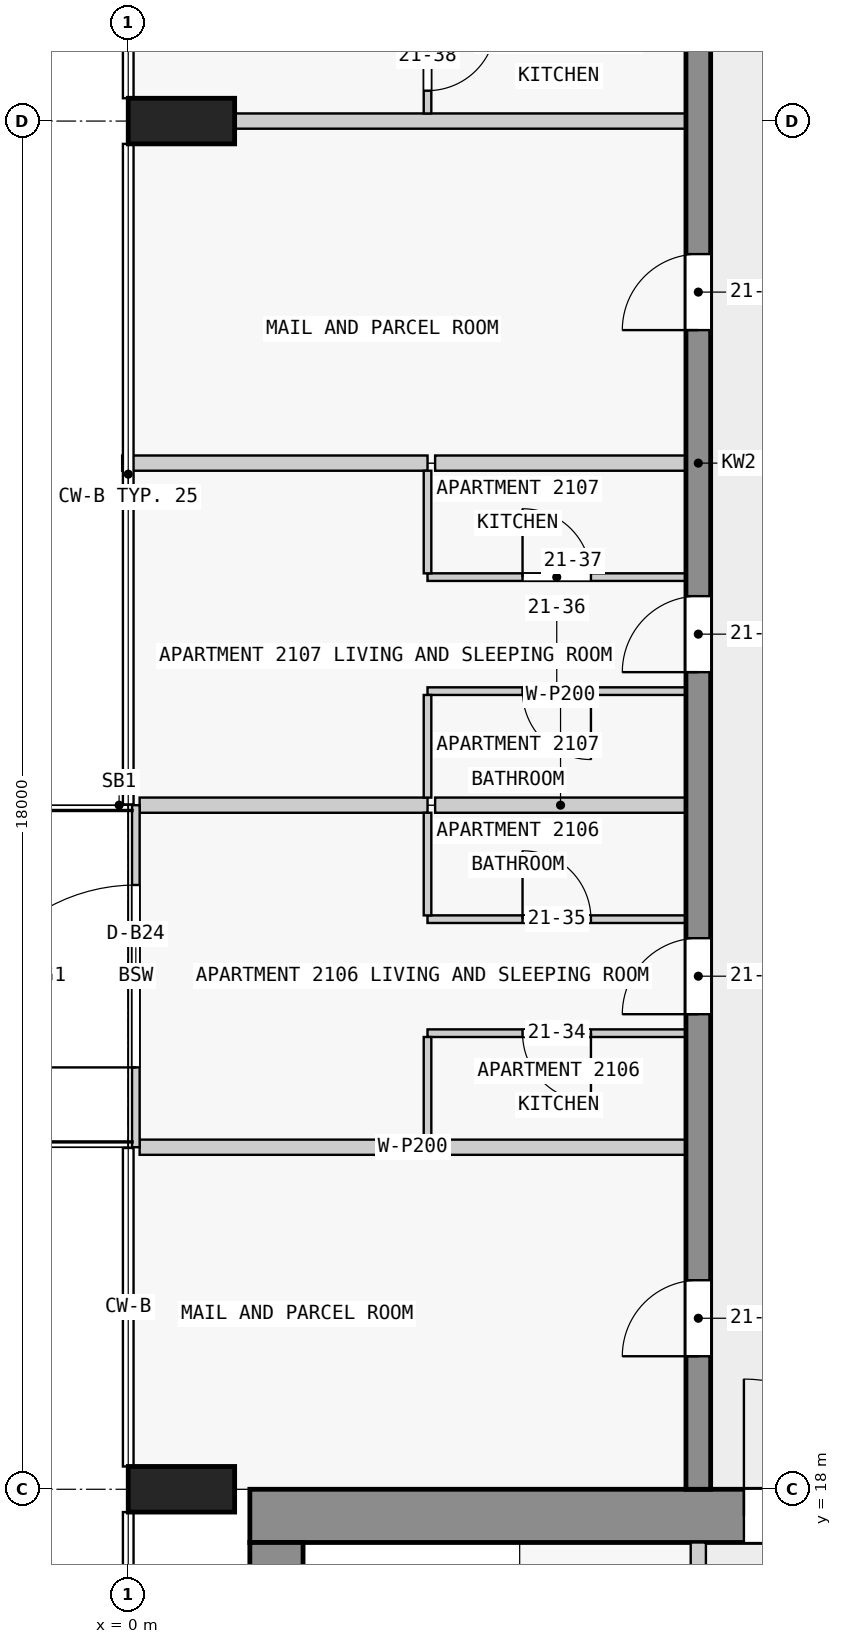
"""IFC4 building model, lengths in metres.
Left out: names, types, materials, properties, quantities, classifications, styles, units other than length and angle.
Written with IfcOpenShell. Run it as: python <this file> out.ifc"""

import sys

from ifc_helpers import new_model, si_unit, direction, frame, frame_2d, origin, origin_2d, place, context, subcontext, project, spatial, rectangle, extrude, element, fill, save


model = new_model("IFC4")
c1 = context("Model", 3, precision=1e-05, world=origin(), true_north=direction((0.0, 1.0)))
c2 = subcontext(c1, "Body", "Model", "MODEL_VIEW")
j1 = project(units=[si_unit("LENGTHUNIT", "METRE"), si_unit("PLANEANGLEUNIT", "RADIAN")], contexts=[c1])
p1 = place(None, origin())
s1 = spatial("IfcSite", under=j1, at=p1, CompositionType="ELEMENT")
p2 = place(p1, origin())
s2 = spatial("IfcBuilding", under=s1, at=p2, CompositionType="ELEMENT")
p3 = place(p2, frame((0.0, 0.0, 85.3)))
s3 = spatial("IfcBuildingStorey", under=s2, at=p3, CompositionType="ELEMENT", Elevation=85.3)
for number, where, z_axis, x_axis in (
    (1, (0.7, 36.0, 0.0), (0.0, 0.0, 1.0), (0.0, 1.0, 0.0)),
    (2, (0.7, 18.0, 0.0), (0.0, 0.0, 1.0), (0.0, 1.0, 0.0)),
):
    element("IfcColumn", number, at=place(p3, frame(where, z_axis=z_axis, x_axis=x_axis)), inside=s3, PredefinedType="COLUMN", context=c2, shape_type="SweptSolid", body=[
        extrude(rectangle(XDim=0.6, YDim=1.4, at=origin_2d()), origin(), (0.0, 0.0, 1.0), 3.5),
    ])
p4 = place(p3, frame((1.6, 17.65, 0.0), z_axis=(0.0, 0.0, 1.0), x_axis=(1.0, 0.0, 0.0)))
e3 = element("IfcWall", 3, at=p4, inside=s3, PredefinedType="SHEAR", context=c2, shape_type="SweptSolid", body=[
    extrude(rectangle(XDim=20.9, YDim=0.7, at=frame_2d((10.45, 0.0))), origin(), (0.0, 0.0, 1.0), 3.25),
])
p5 = place(p4, frame((6.5, 0.0, 0.0)))
e4 = element("IfcOpeningElement", 4, at=p5, cuts=e3, PredefinedType="OPENING", context=c2, shape_type="SweptSolid", body=[
    extrude(rectangle(XDim=1.8, YDim=2.1, at=frame_2d((0.9, 1.05))), frame((0.0, 0.36, 0.0), z_axis=(0.0, -1.0, 0.0), x_axis=(1.0, 0.0, 0.0)), (0.0, 0.0, 1.0), 0.72),
])
p6 = place(p3, frame((1.95, 2.5, 0.0), z_axis=(0.0, 0.0, 1.0), x_axis=(0.0, 1.0, 0.0)))
e5 = element("IfcWall", 5, at=p6, inside=s3, PredefinedType="SHEAR", context=c2, shape_type="SweptSolid", body=[
    extrude(rectangle(XDim=14.8, YDim=0.7, at=frame_2d((7.4, 0.0))), origin(), (0.0, 0.0, 1.0), 3.25),
])
p7 = place(p3, frame((7.5, 18.0, 0.0), z_axis=(0.0, 0.0, 1.0), x_axis=(0.0, 1.0, 0.0)))
e6 = element("IfcWall", 6, at=p7, inside=s3, PredefinedType="SHEAR", context=c2, shape_type="SweptSolid", body=[
    extrude(rectangle(XDim=27.0, YDim=0.325, at=frame_2d((13.5, 0.0))), origin(), (0.0, 0.0, 1.0), 3.25),
])
p8 = place(p7, frame((1.75, 0.0, 0.0)))
e7 = element("IfcOpeningElement", 7, at=p8, cuts=e6, PredefinedType="OPENING", context=c2, shape_type="SweptSolid", body=[
    extrude(rectangle(XDim=1.0, YDim=2.1, at=frame_2d((0.5, 1.05))), frame((0.0, 0.172, 0.0), z_axis=(0.0, -1.0, 0.0), x_axis=(1.0, 0.0, 0.0)), (0.0, 0.0, 1.0), 0.345),
])
p9 = place(p7, frame((6.25, 0.0, 0.0)))
e8 = element("IfcOpeningElement", 8, at=p9, cuts=e6, PredefinedType="OPENING", context=c2, shape_type="SweptSolid", body=[
    extrude(rectangle(XDim=1.0, YDim=2.1, at=frame_2d((0.5, 1.05))), frame((0.0, 0.172, 0.0), z_axis=(0.0, -1.0, 0.0), x_axis=(1.0, 0.0, 0.0)), (0.0, 0.0, 1.0), 0.345),
])
p10 = place(p7, frame((10.75, 0.0, 0.0)))
e9 = element("IfcOpeningElement", 9, at=p10, cuts=e6, PredefinedType="OPENING", context=c2, shape_type="SweptSolid", body=[
    extrude(rectangle(XDim=1.0, YDim=2.1, at=frame_2d((0.5, 1.05))), frame((0.0, 0.172, 0.0), z_axis=(0.0, -1.0, 0.0), x_axis=(1.0, 0.0, 0.0)), (0.0, 0.0, 1.0), 0.345),
])
p11 = place(p7, frame((15.25, 0.0, 0.0)))
e10 = element("IfcOpeningElement", 10, at=p11, cuts=e6, PredefinedType="OPENING", context=c2, shape_type="SweptSolid", body=[
    extrude(rectangle(XDim=1.0, YDim=2.1, at=frame_2d((0.5, 1.05))), frame((0.0, 0.172, 0.0), z_axis=(0.0, -1.0, 0.0), x_axis=(1.0, 0.0, 0.0)), (0.0, 0.0, 1.0), 0.345),
])
p12 = place(p7, frame((21.35, 0.0, 0.0)))
e11 = element("IfcOpeningElement", 11, at=p12, cuts=e6, PredefinedType="OPENING", context=c2, shape_type="SweptSolid", body=[
    extrude(rectangle(XDim=1.0, YDim=2.1, at=frame_2d((0.5, 1.05))), frame((0.0, 0.172, 0.0), z_axis=(0.0, -1.0, 0.0), x_axis=(1.0, 0.0, 0.0)), (0.0, 0.0, 1.0), 0.345),
])
p13 = place(p3, frame((0.1, 22.5, 0.0), z_axis=(0.0, 0.0, 1.0), x_axis=(0.0, 1.0, 0.0)))
e12 = element("IfcWall", 12, at=p13, inside=s3, PredefinedType="STANDARD", context=c2, shape_type="SweptSolid", body=[
    extrude(rectangle(XDim=4.5, YDim=0.1, at=frame_2d((2.25, 0.0))), origin(), (0.0, 0.0, 1.0), 3.25),
])
p14 = place(p13, frame((1.05, 0.0, 0.0)))
e13 = element("IfcOpeningElement", 13, at=p14, cuts=e12, PredefinedType="OPENING", context=c2, shape_type="SweptSolid", body=[
    extrude(rectangle(XDim=2.4, YDim=2.4, at=frame_2d((1.2, 1.2))), frame((0.0, 0.06, 0.0), z_axis=(0.0, -1.0, 0.0), x_axis=(1.0, 0.0, 0.0)), (0.0, 0.0, 1.0), 0.12),
])
p15 = place(p3, frame((7.5, 10.1, 0.0), z_axis=(0.0, 0.0, 1.0), x_axis=(0.0, 1.0, 0.0)))
e14 = element("IfcWall", 14, at=p15, inside=s3, PredefinedType="PARTITIONING", context=c2, shape_type="SweptSolid", body=[
    extrude(rectangle(XDim=7.2, YDim=0.2, at=frame_2d((3.6, 0.0))), origin(), (0.0, 0.0, 1.0), 3.25),
])
p16 = place(p15, frame((0.75, 0.0, 0.0)))
e15 = element("IfcOpeningElement", 15, at=p16, cuts=e14, PredefinedType="OPENING", context=c2, shape_type="SweptSolid", body=[
    extrude(rectangle(XDim=0.9, YDim=2.1, at=frame_2d((0.45, 1.05))), frame((0.0, 0.11, 0.0), z_axis=(0.0, -1.0, 0.0), x_axis=(1.0, 0.0, 0.0)), (0.0, 0.0, 1.0), 0.22),
])
p17 = place(p15, frame((3.175, 0.0, 0.0)))
e16 = element("IfcOpeningElement", 16, at=p17, cuts=e14, PredefinedType="OPENING", context=c2, shape_type="SweptSolid", body=[
    extrude(rectangle(XDim=0.9, YDim=2.1, at=frame_2d((0.45, 1.05))), frame((0.0, 0.11, 0.0), z_axis=(0.0, -1.0, 0.0), x_axis=(1.0, 0.0, 0.0)), (0.0, 0.0, 1.0), 0.22),
])
p18 = place(p15, frame((5.25, 0.0, 0.0)))
e17 = element("IfcOpeningElement", 17, at=p18, cuts=e14, PredefinedType="OPENING", context=c2, shape_type="SweptSolid", body=[
    extrude(rectangle(XDim=0.9, YDim=2.1, at=frame_2d((0.45, 1.05))), frame((0.0, 0.11, 0.0), z_axis=(0.0, -1.0, 0.0), x_axis=(1.0, 0.0, 0.0)), (0.0, 0.0, 1.0), 0.22),
])
p19 = place(p3, frame((7.337, 22.5, 0.0), z_axis=(0.0, 0.0, 1.0), x_axis=(-1.0, 0.0, 0.0)))
e18 = element("IfcWall", 18, at=p19, inside=s3, PredefinedType="PARTITIONING", context=c2, shape_type="SweptSolid", body=[
    extrude(rectangle(XDim=7.188, YDim=0.2, at=frame_2d((3.594, 0.0))), origin(), (0.0, 0.0, 1.0), 3.25),
])
p20 = place(p3, frame((7.337, 24.0, 0.0), z_axis=(0.0, 0.0, 1.0), x_axis=(-1.0, 0.0, 0.0)))
e19 = element("IfcWall", 19, at=p20, inside=s3, PredefinedType="PARTITIONING", context=c2, shape_type="SweptSolid", body=[
    extrude(rectangle(XDim=3.4, YDim=0.1, at=frame_2d((1.7, 0.0))), origin(), (0.0, 0.0, 1.0), 3.25),
])
p21 = place(p20, frame((1.25, 0.0, 0.0)))
e20 = element("IfcOpeningElement", 20, at=p21, cuts=e19, PredefinedType="OPENING", context=c2, shape_type="SweptSolid", body=[
    extrude(rectangle(XDim=0.9, YDim=2.1, at=frame_2d((0.45, 1.05))), frame((0.0, 0.06, 0.0), z_axis=(0.0, -1.0, 0.0), x_axis=(1.0, 0.0, 0.0)), (0.0, 0.0, 1.0), 0.12),
])
p22 = place(p3, frame((3.938, 25.5, 0.0), z_axis=(0.0, 0.0, 1.0), x_axis=(1.0, 0.0, 0.0)))
e21 = element("IfcWall", 21, at=p22, inside=s3, PredefinedType="PARTITIONING", context=c2, shape_type="SweptSolid", body=[
    extrude(rectangle(XDim=3.4, YDim=0.1, at=frame_2d((1.7, 0.0))), origin(), (0.0, 0.0, 1.0), 3.25),
])
p23 = place(p22, frame((1.25, 0.0, 0.0)))
e22 = element("IfcOpeningElement", 22, at=p23, cuts=e21, PredefinedType="OPENING", context=c2, shape_type="SweptSolid", body=[
    extrude(rectangle(XDim=0.9, YDim=2.1, at=frame_2d((0.45, 1.05))), frame((0.0, 0.06, 0.0), z_axis=(0.0, -1.0, 0.0), x_axis=(1.0, 0.0, 0.0)), (0.0, 0.0, 1.0), 0.12),
])
p24 = place(p3, frame((7.337, 27.0, 0.0), z_axis=(0.0, 0.0, 1.0), x_axis=(-1.0, 0.0, 0.0)))
e23 = element("IfcWall", 23, at=p24, inside=s3, PredefinedType="PARTITIONING", context=c2, shape_type="SweptSolid", body=[
    extrude(rectangle(XDim=3.3, YDim=0.2, at=frame_2d((1.65, 0.0))), origin(), (0.0, 0.0, 1.0), 3.25),
])
p25 = place(p3, frame((0.15, 27.0, 0.0), z_axis=(0.0, 0.0, 1.0), x_axis=(1.0, 0.0, 0.0)))
e24 = element("IfcWall", 24, at=p25, inside=s3, PredefinedType="PARTITIONING", context=c2, shape_type="SweptSolid", body=[
    extrude(rectangle(XDim=3.788, YDim=0.2, at=frame_2d((1.894, 0.0))), origin(), (0.0, 0.0, 1.0), 3.25),
])
p26 = place(p3, frame((7.337, 28.5, 0.0), z_axis=(0.0, 0.0, 1.0), x_axis=(-1.0, 0.0, 0.0)))
e25 = element("IfcWall", 25, at=p26, inside=s3, PredefinedType="PARTITIONING", context=c2, shape_type="SweptSolid", body=[
    extrude(rectangle(XDim=3.4, YDim=0.1, at=frame_2d((1.7, 0.0))), origin(), (0.0, 0.0, 1.0), 3.25),
])
p27 = place(p26, frame((1.25, 0.0, 0.0)))
e26 = element("IfcOpeningElement", 26, at=p27, cuts=e25, PredefinedType="OPENING", context=c2, shape_type="SweptSolid", body=[
    extrude(rectangle(XDim=0.9, YDim=2.1, at=frame_2d((0.45, 1.05))), frame((0.0, 0.06, 0.0), z_axis=(0.0, -1.0, 0.0), x_axis=(1.0, 0.0, 0.0)), (0.0, 0.0, 1.0), 0.12),
])
p28 = place(p3, frame((3.938, 30.0, 0.0), z_axis=(0.0, 0.0, 1.0), x_axis=(1.0, 0.0, 0.0)))
e27 = element("IfcWall", 27, at=p28, inside=s3, PredefinedType="PARTITIONING", context=c2, shape_type="SweptSolid", body=[
    extrude(rectangle(XDim=3.4, YDim=0.1, at=frame_2d((1.7, 0.0))), origin(), (0.0, 0.0, 1.0), 3.25),
])
p29 = place(p28, frame((1.25, 0.0, 0.0)))
e28 = element("IfcOpeningElement", 28, at=p29, cuts=e27, PredefinedType="OPENING", context=c2, shape_type="SweptSolid", body=[
    extrude(rectangle(XDim=0.9, YDim=2.1, at=frame_2d((0.45, 1.05))), frame((0.0, 0.06, 0.0), z_axis=(0.0, -1.0, 0.0), x_axis=(1.0, 0.0, 0.0)), (0.0, 0.0, 1.0), 0.12),
])
p30 = place(p3, frame((7.337, 31.5, 0.0), z_axis=(0.0, 0.0, 1.0), x_axis=(-1.0, 0.0, 0.0)))
e29 = element("IfcWall", 29, at=p30, inside=s3, PredefinedType="PARTITIONING", context=c2, shape_type="SweptSolid", body=[
    extrude(rectangle(XDim=3.3, YDim=0.2, at=frame_2d((1.65, 0.0))), origin(), (0.0, 0.0, 1.0), 3.25),
])
p31 = place(p3, frame((-0.08, 31.5, 0.0), z_axis=(0.0, 0.0, 1.0), x_axis=(1.0, 0.0, 0.0)))
e30 = element("IfcWall", 30, at=p31, inside=s3, PredefinedType="PARTITIONING", context=c2, shape_type="SweptSolid", body=[
    extrude(rectangle(XDim=4.018, YDim=0.2, at=frame_2d((2.009, 0.0))), origin(), (0.0, 0.0, 1.0), 3.25),
])
p32 = place(p3, frame((7.337, 36.0, 0.0), z_axis=(0.0, 0.0, 1.0), x_axis=(-1.0, 0.0, 0.0)))
e31 = element("IfcWall", 31, at=p32, inside=s3, PredefinedType="PARTITIONING", context=c2, shape_type="SweptSolid", body=[
    extrude(rectangle(XDim=5.938, YDim=0.2, at=frame_2d((2.969, 0.0))), origin(), (0.0, 0.0, 1.0), 3.25),
])
for number, where, z_axis, x_axis in (
    (32, (3.938, 23.95, 0.0), (0.0, 0.0, 1.0), (0.0, -1.0, 0.0)),
    (33, (3.938, 26.9, 0.0), (0.0, 0.0, 1.0), (0.0, -1.0, 0.0)),
    (34, (3.938, 28.45, 0.0), (0.0, 0.0, 1.0), (0.0, -1.0, 0.0)),
    (35, (3.938, 31.4, 0.0), (0.0, 0.0, 1.0), (0.0, -1.0, 0.0)),
):
    element("IfcWall", number, at=place(p3, frame(where, z_axis=z_axis, x_axis=x_axis)), inside=s3, PredefinedType="PARTITIONING", context=c2, shape_type="SweptSolid", body=[
        extrude(rectangle(XDim=1.35, YDim=0.1, at=frame_2d((0.675, 0.0))), origin(), (0.0, 0.0, 1.0), 3.25),
    ])
p33 = place(p3, frame((3.938, 37.55, 0.0), z_axis=(0.0, 0.0, 1.0), x_axis=(0.0, -1.0, 0.0)))
e36 = element("IfcWall", 36, at=p33, inside=s3, PredefinedType="PARTITIONING", context=c2, shape_type="SweptSolid", body=[
    extrude(rectangle(XDim=1.45, YDim=0.1, at=frame_2d((0.725, 0.0))), origin(), (0.0, 0.0, 1.0), 3.25),
])
p34 = place(p33, frame((0.25, 0.0, 0.0)))
e37 = element("IfcOpeningElement", 37, at=p34, cuts=e36, PredefinedType="OPENING", context=c2, shape_type="SweptSolid", body=[
    extrude(rectangle(XDim=0.9, YDim=2.1, at=frame_2d((0.45, 1.05))), frame((0.0, 0.06, 0.0), z_axis=(0.0, -1.0, 0.0), x_axis=(1.0, 0.0, 0.0)), (0.0, 0.0, 1.0), 0.12),
])
p35 = place(p14, origin())
e38 = element("IfcDoor", 38, at=p35, inside=s3, OperationType="SINGLE_SWING_LEFT", PredefinedType="DOOR", context=c2, shape_type="SweptSolid", body=[
    extrude(rectangle(XDim=2.4, YDim=2.4, at=frame_2d((1.2, 1.2))), frame((0.0, 0.025, 0.0), z_axis=(0.0, -1.0, 0.0), x_axis=(1.0, 0.0, 0.0)), (0.0, 0.0, 1.0), 0.05),
])
fill(e13, e38)
p36 = place(p5, origin())
e39 = element("IfcDoor", 39, at=p36, inside=s3, OperationType="DOUBLE_DOOR_SINGLE_SWING", PredefinedType="DOOR", context=c2, shape_type="SweptSolid", body=[
    extrude(rectangle(XDim=1.8, YDim=2.1, at=frame_2d((0.9, 1.05))), frame((0.0, 0.025, 0.0), z_axis=(0.0, -1.0, 0.0), x_axis=(1.0, 0.0, 0.0)), (0.0, 0.0, 1.0), 0.05),
])
fill(e4, e39)
p37 = place(p8, origin())
e40 = element("IfcDoor", 40, at=p37, inside=s3, OperationType="SINGLE_SWING_LEFT", PredefinedType="DOOR", context=c2, shape_type="SweptSolid", body=[
    extrude(rectangle(XDim=1.0, YDim=2.1, at=frame_2d((0.5, 1.05))), frame((0.0, 0.025, 0.0), z_axis=(0.0, -1.0, 0.0), x_axis=(1.0, 0.0, 0.0)), (0.0, 0.0, 1.0), 0.05),
])
fill(e7, e40)
p38 = place(p9, origin())
e41 = element("IfcDoor", 41, at=p38, inside=s3, OperationType="SINGLE_SWING_LEFT", PredefinedType="DOOR", context=c2, shape_type="SweptSolid", body=[
    extrude(rectangle(XDim=1.0, YDim=2.1, at=frame_2d((0.5, 1.05))), frame((0.0, 0.025, 0.0), z_axis=(0.0, -1.0, 0.0), x_axis=(1.0, 0.0, 0.0)), (0.0, 0.0, 1.0), 0.05),
])
fill(e8, e41)
p39 = place(p10, origin())
e42 = element("IfcDoor", 42, at=p39, inside=s3, OperationType="SINGLE_SWING_LEFT", PredefinedType="DOOR", context=c2, shape_type="SweptSolid", body=[
    extrude(rectangle(XDim=1.0, YDim=2.1, at=frame_2d((0.5, 1.05))), frame((0.0, 0.025, 0.0), z_axis=(0.0, -1.0, 0.0), x_axis=(1.0, 0.0, 0.0)), (0.0, 0.0, 1.0), 0.05),
])
fill(e9, e42)
p40 = place(p11, origin())
e43 = element("IfcDoor", 43, at=p40, inside=s3, OperationType="SINGLE_SWING_RIGHT", PredefinedType="DOOR", context=c2, shape_type="SweptSolid", body=[
    extrude(rectangle(XDim=1.0, YDim=2.1, at=frame_2d((0.5, 1.05))), frame((0.0, 0.025, 0.0), z_axis=(0.0, -1.0, 0.0), x_axis=(1.0, 0.0, 0.0)), (0.0, 0.0, 1.0), 0.05),
])
fill(e10, e43)
p41 = place(p21, origin())
e44 = element("IfcDoor", 44, at=p41, inside=s3, OperationType="SINGLE_SWING_LEFT", PredefinedType="DOOR", context=c2, shape_type="SweptSolid", body=[
    extrude(rectangle(XDim=0.9, YDim=2.1, at=frame_2d((0.45, 1.05))), frame((0.0, 0.025, 0.0), z_axis=(0.0, -1.0, 0.0), x_axis=(1.0, 0.0, 0.0)), (0.0, 0.0, 1.0), 0.05),
])
fill(e20, e44)
p42 = place(p23, origin())
e45 = element("IfcDoor", 45, at=p42, inside=s3, OperationType="SINGLE_SWING_LEFT", PredefinedType="DOOR", context=c2, shape_type="SweptSolid", body=[
    extrude(rectangle(XDim=0.9, YDim=2.1, at=frame_2d((0.45, 1.05))), frame((0.0, 0.025, 0.0), z_axis=(0.0, -1.0, 0.0), x_axis=(1.0, 0.0, 0.0)), (0.0, 0.0, 1.0), 0.05),
])
fill(e22, e45)
p43 = place(p27, origin())
e46 = element("IfcDoor", 46, at=p43, inside=s3, OperationType="SINGLE_SWING_LEFT", PredefinedType="DOOR", context=c2, shape_type="SweptSolid", body=[
    extrude(rectangle(XDim=0.9, YDim=2.1, at=frame_2d((0.45, 1.05))), frame((0.0, 0.025, 0.0), z_axis=(0.0, -1.0, 0.0), x_axis=(1.0, 0.0, 0.0)), (0.0, 0.0, 1.0), 0.05),
])
fill(e26, e46)
p44 = place(p29, origin())
e47 = element("IfcDoor", 47, at=p44, inside=s3, OperationType="SINGLE_SWING_LEFT", PredefinedType="DOOR", context=c2, shape_type="SweptSolid", body=[
    extrude(rectangle(XDim=0.9, YDim=2.1, at=frame_2d((0.45, 1.05))), frame((0.0, 0.025, 0.0), z_axis=(0.0, -1.0, 0.0), x_axis=(1.0, 0.0, 0.0)), (0.0, 0.0, 1.0), 0.05),
])
fill(e28, e47)
p45 = place(p34, origin())
e48 = element("IfcDoor", 48, at=p45, inside=s3, OperationType="SINGLE_SWING_LEFT", PredefinedType="DOOR", context=c2, shape_type="SweptSolid", body=[
    extrude(rectangle(XDim=0.9, YDim=2.1, at=frame_2d((0.45, 1.05))), frame((0.0, 0.025, 0.0), z_axis=(0.0, -1.0, 0.0), x_axis=(1.0, 0.0, 0.0)), (0.0, 0.0, 1.0), 0.05),
])
fill(e37, e48)
save(model, sys.argv[1])
